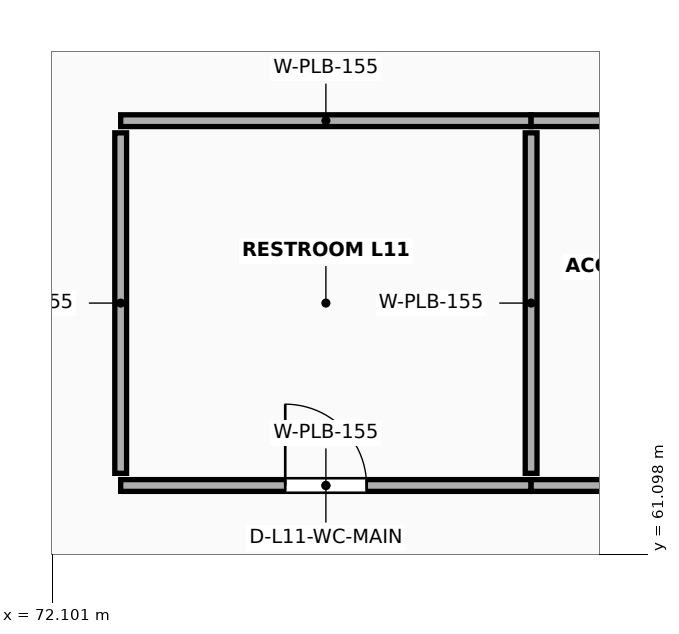
"""IFC4 building model, lengths in metres.
Left out: names, types, materials, properties, quantities, classifications, styles, units other than length and angle.
Written with IfcOpenShell. Run it as: python <this file> out.ifc"""

import sys

from ifc_helpers import new_model, si_unit, direction, frame, frame_2d, origin, place, context, subcontext, project, spatial, rectangle, extrude, element, fill, save


model = new_model("IFC4")
c1 = context("Model", 3, precision=1e-05, world=origin(), true_north=direction((0.0, 1.0)))
c2 = subcontext(c1, "Body", "Model", "MODEL_VIEW")
j1 = project(units=[si_unit("LENGTHUNIT", "METRE"), si_unit("PLANEANGLEUNIT", "RADIAN")], contexts=[c1])
p1 = place(None, origin())
s1 = spatial("IfcSite", under=j1, at=p1, CompositionType="ELEMENT")
p2 = place(p1, origin())
s2 = spatial("IfcBuilding", under=s1, at=p2, CompositionType="ELEMENT")
p3 = place(p2, frame((0.0, 0.0, 45.6)))
s3 = spatial("IfcBuildingStorey", under=s2, at=p3, CompositionType="ELEMENT", Elevation=45.6)
p4 = place(p3, frame((73.0, 62.0, 0.0), z_axis=(0.0, 0.0, 1.0), x_axis=(1.0, 0.0, 0.0)))
e1 = element("IfcWall", 1, at=p4, inside=s3, PredefinedType="PLUMBINGWALL", context=c2, shape_type="SweptSolid", body=[
    extrude(rectangle(XDim=5.4, YDim=0.155, at=frame_2d((2.7, 0.0))), origin(), (0.0, 0.0, 1.0), 2.88),
])
p5 = place(p4, frame((2.165, 0.0, 0.0)))
e2 = element("IfcOpeningElement", 2, at=p5, cuts=e1, PredefinedType="OPENING", context=c2, shape_type="SweptSolid", body=[
    extrude(rectangle(XDim=1.07, YDim=2.19, at=frame_2d((0.535, 1.095))), frame((0.0, 0.093, 0.0), z_axis=(0.0, -1.0, 0.0), x_axis=(1.0, 0.0, 0.0)), (0.0, 0.0, 1.0), 0.185),
])
p6 = place(p3, frame((73.0, 66.8, 0.0), z_axis=(0.0, 0.0, 1.0), x_axis=(1.0, 0.0, 0.0)))
e3 = element("IfcWall", 3, at=p6, inside=s3, PredefinedType="PLUMBINGWALL", context=c2, shape_type="SweptSolid", body=[
    extrude(rectangle(XDim=5.4, YDim=0.155, at=frame_2d((2.7, 0.0))), origin(), (0.0, 0.0, 1.0), 2.88),
])
for number, where, z_axis, x_axis in (
    (4, (73.0, 62.16, 0.0), (0.0, 0.0, 1.0), (0.0, 1.0, 0.0)),
    (5, (78.4, 62.16, 0.0), (0.0, 0.0, 1.0), (0.0, 1.0, 0.0)),
):
    element("IfcWall", number, at=place(p3, frame(where, z_axis=z_axis, x_axis=x_axis)), inside=s3, PredefinedType="PLUMBINGWALL", context=c2, shape_type="SweptSolid", body=[
        extrude(rectangle(XDim=4.48, YDim=0.155, at=frame_2d((2.24, 0.0))), origin(), (0.0, 0.0, 1.0), 2.88),
    ])
p7 = place(p3, frame((78.4, 62.0, 0.0), z_axis=(0.0, 0.0, 1.0), x_axis=(1.0, 0.0, 0.0)))
e6 = element("IfcWall", 6, at=p7, inside=s3, PredefinedType="PLUMBINGWALL", context=c2, shape_type="SweptSolid", body=[
    extrude(rectangle(XDim=3.8, YDim=0.155, at=frame_2d((1.9, 0.0))), origin(), (0.0, 0.0, 1.0), 2.88),
])
p8 = place(p7, frame((1.345, 0.0, 0.0)))
e7 = element("IfcOpeningElement", 7, at=p8, cuts=e6, PredefinedType="OPENING", context=c2, shape_type="SweptSolid", body=[
    extrude(rectangle(XDim=1.11, YDim=2.21, at=frame_2d((0.555, 1.105))), frame((0.0, 0.093, 0.0), z_axis=(0.0, -1.0, 0.0), x_axis=(1.0, 0.0, 0.0)), (0.0, 0.0, 1.0), 0.185),
])
p9 = place(p3, frame((78.4, 66.8, 0.0), z_axis=(0.0, 0.0, 1.0), x_axis=(1.0, 0.0, 0.0)))
e8 = element("IfcWall", 8, at=p9, inside=s3, PredefinedType="PLUMBINGWALL", context=c2, shape_type="SweptSolid", body=[
    extrude(rectangle(XDim=3.8, YDim=0.155, at=frame_2d((1.9, 0.0))), origin(), (0.0, 0.0, 1.0), 2.88),
])
p10 = place(p5, origin())
e9 = element("IfcDoor", 9, at=p10, inside=s3, OperationType="SINGLE_SWING_LEFT", PredefinedType="DOOR", context=c2, shape_type="SweptSolid", body=[
    extrude(rectangle(XDim=1.07, YDim=2.19, at=frame_2d((0.535, 1.095))), frame((0.0, 0.025, 0.0), z_axis=(0.0, -1.0, 0.0), x_axis=(1.0, 0.0, 0.0)), (0.0, 0.0, 1.0), 0.05),
])
fill(e2, e9)
save(model, sys.argv[1])
